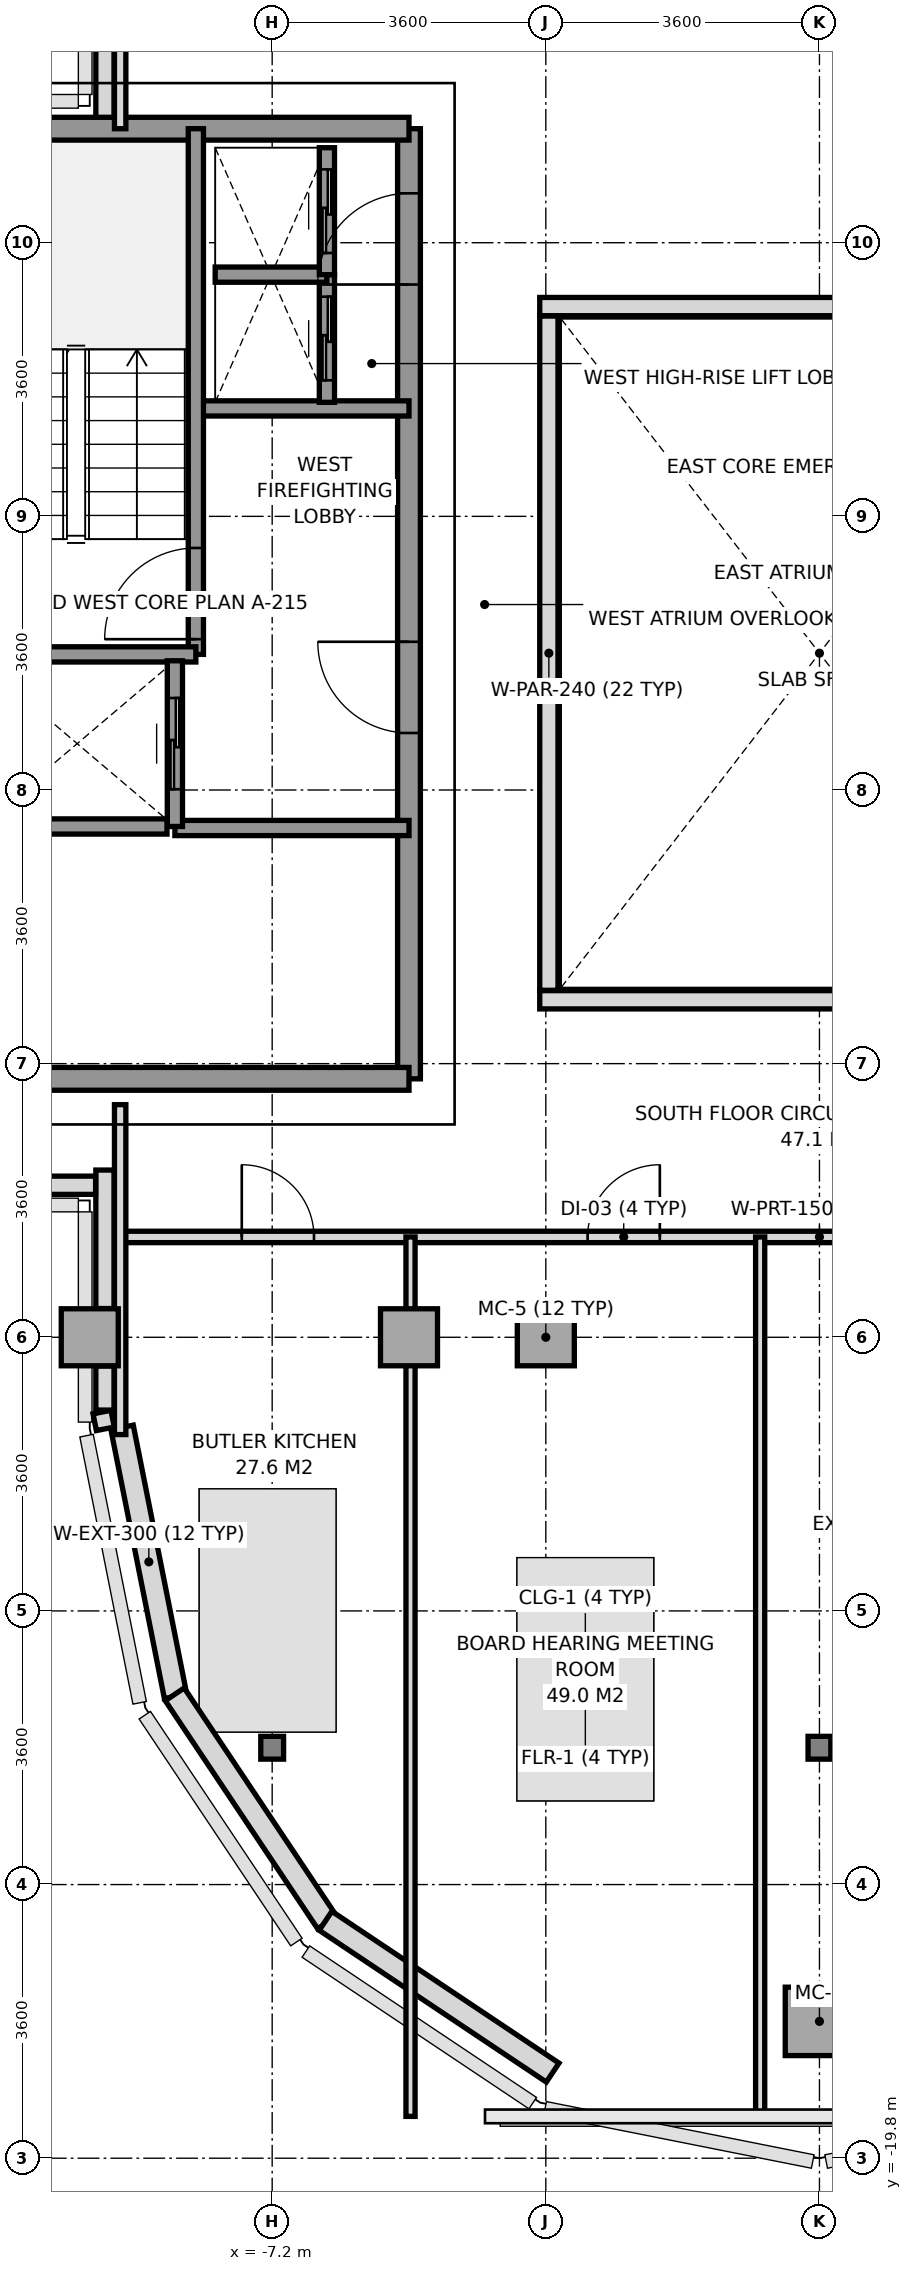
"""IFC4 building model, lengths in metres.
Left out: names, types, materials, properties, quantities, classifications, styles, units other than length and angle.
Written with IfcOpenShell. Run it as: python <this file> out.ifc"""

import sys

from ifc_helpers import new_model, si_unit, direction, frame, frame_2d, origin, origin_2d, place, context, subcontext, project, spatial, rectangle, i_section, extrude, source, transform, mapped, element, fill, save


model = new_model("IFC4")
c1 = context("Model", 3, precision=1e-05, world=origin(), true_north=direction((0.0, 1.0)))
c2 = subcontext(c1, "Body", "Model", "MODEL_VIEW")
j1 = project(units=[si_unit("LENGTHUNIT", "METRE"), si_unit("PLANEANGLEUNIT", "RADIAN")], contexts=[c1])
p1 = place(None, origin())
s1 = spatial("IfcSite", under=j1, at=p1, CompositionType="ELEMENT")
p2 = place(p1, origin())
s2 = spatial("IfcBuilding", under=s1, at=p2, CompositionType="ELEMENT")
p3 = place(p2, frame((0.0, 0.0, 262.0)))
s3 = spatial("IfcBuildingStorey", under=s2, at=p3, CompositionType="ELEMENT", Elevation=262.0)
m1 = source(origin(), c2, "Body", "SweptSolid", [
    extrude(rectangle(XDim=0.75, YDim=0.75, at=origin_2d()), origin(), (0.0, 0.0, 1.0), 3.01),
])
p4 = place(p3, frame((-9.6, -9.0, 0.0), z_axis=(0.0, 0.0, 1.0), x_axis=(1.0, 0.0, 0.0)))
e1 = element("IfcColumn", 1, at=p4, inside=s3, PredefinedType="COLUMN", context=c2, shape_type="MappedRepresentation", body=[
    mapped(m1, transform((0.0, 0.0, 0.0), x_axis=(1.0, 0.0, 0.0), y_axis=(0.0, 1.0, 0.0), z_axis=(0.0, 0.0, 1.0), scale=1.0)),
])
m2 = source(origin(), c2, "Body", "SweptSolid", [
    extrude(i_section(OverallWidth=0.3, OverallDepth=0.3, WebThickness=0.011, FlangeThickness=0.019, at=origin_2d()), origin(), (0.0, 0.0, 1.0), 3.01),
])
p5 = place(p3, frame((-7.2, -14.4, 0.0), z_axis=(0.0, 0.0, 1.0), x_axis=(1.0, 0.0, 0.0)))
e2 = element("IfcColumn", 2, at=p5, inside=s3, PredefinedType="COLUMN", context=c2, shape_type="MappedRepresentation", body=[
    mapped(m2, transform((0.0, 0.0, 0.0), x_axis=(1.0, 0.0, 0.0), y_axis=(0.0, 1.0, 0.0), z_axis=(0.0, 0.0, 1.0), scale=1.0)),
])
for number, where, z_axis, x_axis in (
    (3, (-5.4, -9.0, 0.0), (0.0, 0.0, 1.0), (1.0, 0.0, 0.0)),
    (4, (-3.6, -9.0, 0.0), (0.0, 0.0, 1.0), (1.0, 0.0, 0.0)),
):
    element("IfcColumn", number, at=place(p3, frame(where, z_axis=z_axis, x_axis=x_axis)), inside=s3, PredefinedType="COLUMN", context=c2, shape_type="MappedRepresentation", body=[
        mapped(m1, transform((0.0, 0.0, 0.0), x_axis=(1.0, 0.0, 0.0), y_axis=(0.0, 1.0, 0.0), z_axis=(0.0, 0.0, 1.0), scale=1.0)),
    ])
m3 = source(origin(), c2, "Body", "SweptSolid", [
    extrude(rectangle(XDim=0.9, YDim=0.9, at=origin_2d()), origin(), (0.0, 0.0, 1.0), 3.01),
])
p6 = place(p3, frame((0.0, -18.0, 0.0), z_axis=(0.0, 0.0, 1.0), x_axis=(1.0, 0.0, 0.0)))
e5 = element("IfcColumn", 5, at=p6, inside=s3, PredefinedType="COLUMN", context=c2, shape_type="MappedRepresentation", body=[
    mapped(m3, transform((0.0, 0.0, 0.0), x_axis=(1.0, 0.0, 0.0), y_axis=(0.0, 1.0, 0.0), z_axis=(0.0, 0.0, 1.0), scale=1.0)),
])
p7 = place(p3, frame((0.0, -14.4, 0.0), z_axis=(0.0, 0.0, 1.0), x_axis=(1.0, 0.0, 0.0)))
e6 = element("IfcColumn", 6, at=p7, inside=s3, PredefinedType="COLUMN", context=c2, shape_type="MappedRepresentation", body=[
    mapped(m2, transform((0.0, 0.0, 0.0), x_axis=(1.0, 0.0, 0.0), y_axis=(0.0, 1.0, 0.0), z_axis=(0.0, 0.0, 1.0), scale=1.0)),
])
p8 = place(p3, frame((-9.175, -10.185, 0.0), z_axis=(0.0, 0.0, 1.0), x_axis=(0.195114232679, -0.980780523974, 0.0)))
e7 = element("IfcWall", 7, at=p8, inside=s3, PredefinedType="SOLIDWALL", context=c2, shape_type="SweptSolid", body=[
    extrude(rectangle(XDim=3.609, YDim=0.3, at=frame_2d((1.804, 0.0))), origin(), (0.0, 0.0, 1.0), 3.01),
])
p9 = place(p3, frame((-8.482, -13.698, 0.0), z_axis=(0.0, 0.0, 1.0), x_axis=(0.555574187116, -0.831466970246, 0.0)))
e8 = element("IfcWall", 8, at=p9, inside=s3, PredefinedType="SOLIDWALL", context=c2, shape_type="SweptSolid", body=[
    extrude(rectangle(XDim=3.609, YDim=0.3, at=frame_2d((1.804, 0.0))), origin(), (0.0, 0.0, 1.0), 2.61),
])
p10 = place(p3, frame((-6.498, -16.677, 0.0), z_axis=(0.0, 0.0, 1.0), x_axis=(0.831443568068, -0.555609208993, 0.0)))
e9 = element("IfcWall", 9, at=p10, inside=s3, PredefinedType="SOLIDWALL", context=c2, shape_type="SweptSolid", body=[
    extrude(rectangle(XDim=3.594, YDim=0.3, at=frame_2d((1.797, 0.0))), origin(), (0.0, 0.0, 1.0), 3.01),
])
p11 = place(p3, frame((-9.395, -10.204, 0.0), z_axis=(0.0, 0.0, 1.0), x_axis=(-0.194859894132, 0.980831087221, 0.0)))
e10 = element("IfcWall", 10, at=p11, inside=s3, PredefinedType="PARAPET", context=c2, shape_type="SweptSolid", body=[
    extrude(rectangle(XDim=0.224, YDim=0.24, at=frame_2d((0.112, 0.0))), origin(), (0.0, 0.0, 1.0), 1.15),
])
p12 = place(p3, frame((-9.4, -9.958, 0.0), z_axis=(0.0, 0.0, 1.0), x_axis=(0.0, 1.0, 0.0)))
e11 = element("IfcWall", 11, at=p12, inside=s3, PredefinedType="PARAPET", context=c2, shape_type="SweptSolid", body=[
    extrude(rectangle(XDim=0.58, YDim=0.24, at=frame_2d((0.29, 0.0))), origin(), (0.0, 0.0, 1.0), 1.15),
])
p13 = place(p3, frame((-9.4, -8.622, 0.0), z_axis=(0.0, 0.0, 1.0), x_axis=(0.0, 1.0, 0.0)))
e12 = element("IfcWall", 12, at=p13, inside=s3, PredefinedType="PARAPET", context=c2, shape_type="SweptSolid", body=[
    extrude(rectangle(XDim=1.822, YDim=0.24, at=frame_2d((0.911, 0.0))), origin(), (0.0, 0.0, 1.0), 1.15),
])
p14 = place(p3, frame((-9.523, -7.0, 0.0), z_axis=(0.0, 0.0, 1.0), x_axis=(-1.0, 0.0, 0.0)))
e13 = element("IfcWall", 13, at=p14, inside=s3, PredefinedType="PARAPET", context=c2, shape_type="SweptSolid", body=[
    extrude(rectangle(XDim=3.477, YDim=0.24, at=frame_2d((1.739, 0.0))), origin(), (0.0, 0.0, 1.0), 1.15),
])
p15 = place(p3, frame((-9.4, 6.953, 0.0), z_axis=(0.0, 0.0, 1.0), x_axis=(0.0, 1.0, 0.0)))
e14 = element("IfcWall", 14, at=p15, inside=s3, PredefinedType="PARAPET", context=c2, shape_type="SweptSolid", body=[
    extrude(rectangle(XDim=1.669, YDim=0.24, at=frame_2d((0.834, 0.0))), origin(), (0.0, 0.0, 1.0), 1.15),
])
p16 = place(p3, frame((-5.4, -5.6, 0.0), z_axis=(0.0, 0.0, 1.0), x_axis=(0.0, 1.0, 0.0)))
e15 = element("IfcWall", 15, at=p16, inside=s3, PredefinedType="SHEAR", context=c2, shape_type="SweptSolid", body=[
    extrude(rectangle(XDim=12.5, YDim=0.3, at=frame_2d((6.25, 0.0))), origin(), (0.0, 0.0, 1.0), 3.01),
])
p17 = place(p16, frame((4.55, 0.0, 0.0)))
e16 = element("IfcOpeningElement", 16, at=p17, cuts=e15, PredefinedType="OPENING", context=c2, shape_type="SweptSolid", body=[
    extrude(rectangle(XDim=1.2, YDim=2.2, at=frame_2d((0.6, 1.1))), frame((0.0, 0.16, 0.0), z_axis=(0.0, -1.0, 0.0), x_axis=(1.0, 0.0, 0.0)), (0.0, 0.0, 1.0), 0.32),
])
p18 = place(p16, frame((10.45, 0.0, 0.0)))
e17 = element("IfcOpeningElement", 17, at=p18, cuts=e15, PredefinedType="OPENING", context=c2, shape_type="SweptSolid", body=[
    extrude(rectangle(XDim=1.2, YDim=2.2, at=frame_2d((0.6, 1.1))), frame((0.0, 0.16, 0.0), z_axis=(0.0, -1.0, 0.0), x_axis=(1.0, 0.0, 0.0)), (0.0, 0.0, 1.0), 0.32),
])
p19 = place(p3, frame((-11.356, 6.9, 0.0), z_axis=(0.0, 0.0, 1.0), x_axis=(1.0, 0.0, 0.0)))
e18 = element("IfcWall", 18, at=p19, inside=s3, PredefinedType="SHEAR", context=c2, shape_type="SweptSolid", body=[
    extrude(rectangle(XDim=5.956, YDim=0.3, at=frame_2d((2.978, 0.0))), origin(), (0.0, 0.0, 1.0), 3.01),
])
p20 = place(p3, frame((-13.2, -5.6, 0.0), z_axis=(0.0, 0.0, 1.0), x_axis=(1.0, 0.0, 0.0)))
e19 = element("IfcWall", 19, at=p20, inside=s3, PredefinedType="SHEAR", context=c2, shape_type="SweptSolid", body=[
    extrude(rectangle(XDim=7.8, YDim=0.3, at=frame_2d((3.9, 0.0))), origin(), (0.0, 0.0, 1.0), 3.01),
])
p21 = place(p3, frame((-8.18, 3.22, 0.0), z_axis=(0.0, 0.0, 1.0), x_axis=(1.0, 0.0, 0.0)))
e20 = element("IfcWall", 20, at=p21, inside=s3, PredefinedType="SOLIDWALL", context=c2, shape_type="SweptSolid", body=[
    extrude(rectangle(XDim=2.78, YDim=0.2, at=frame_2d((1.39, 0.0))), origin(), (0.0, 0.0, 1.0), 3.01),
])
p22 = place(p3, frame((-8.48, -2.3, 0.0), z_axis=(0.0, 0.0, 1.0), x_axis=(1.0, 0.0, 0.0)))
e21 = element("IfcWall", 21, at=p22, inside=s3, PredefinedType="SOLIDWALL", context=c2, shape_type="SweptSolid", body=[
    extrude(rectangle(XDim=3.08, YDim=0.2, at=frame_2d((1.54, 0.0))), origin(), (0.0, 0.0, 1.0), 3.01),
])
p23 = place(p3, frame((-8.204, -0.016, 0.0), z_axis=(0.0, 0.0, 1.0), x_axis=(0.0, 1.0, 0.0)))
e22 = element("IfcWall", 22, at=p23, inside=s3, PredefinedType="SOLIDWALL", context=c2, shape_type="SweptSolid", body=[
    extrude(rectangle(XDim=6.916, YDim=0.2, at=frame_2d((3.458, 0.0))), origin(), (0.0, 0.0, 1.0), 3.01),
])
p24 = place(p23, frame((0.2, 0.0, 0.0)))
e23 = element("IfcOpeningElement", 23, at=p24, cuts=e22, PredefinedType="OPENING", context=c2, shape_type="SweptSolid", body=[
    extrude(rectangle(XDim=1.2, YDim=2.2, at=frame_2d((0.6, 1.1))), frame((0.0, 0.11, 0.0), z_axis=(0.0, -1.0, 0.0), x_axis=(1.0, 0.0, 0.0)), (0.0, 0.0, 1.0), 0.22),
])
p25 = place(p3, frame((-11.356, -0.016, 0.0), z_axis=(0.0, 0.0, 1.0), x_axis=(1.0, 0.0, 0.0)))
e24 = element("IfcWall", 24, at=p25, inside=s3, PredefinedType="SOLIDWALL", context=c2, shape_type="SweptSolid", body=[
    extrude(rectangle(XDim=3.152, YDim=0.2, at=frame_2d((1.576, 0.0))), origin(), (0.0, 0.0, 1.0), 3.01),
])
p26 = place(p3, frame((-8.48, -2.28, 0.0), z_axis=(0.0, 0.0, 1.0), x_axis=(0.0, 1.0, 0.0)))
e25 = element("IfcWall", 25, at=p26, inside=s3, PredefinedType="SOLIDWALL", context=c2, shape_type="SweptSolid", body=[
    extrude(rectangle(XDim=2.18, YDim=0.2, at=frame_2d((1.09, 0.0))), origin(), (0.0, 0.0, 1.0), 3.01),
])
p27 = place(p26, frame((0.49, 0.0, 0.0)))
e26 = element("IfcOpeningElement", 26, at=p27, cuts=e25, PredefinedType="OPENING", context=c2, shape_type="SweptSolid", body=[
    extrude(rectangle(XDim=1.2, YDim=2.2, at=frame_2d((0.6, 1.1))), frame((0.0, 0.11, 0.0), z_axis=(0.0, -1.0, 0.0), x_axis=(1.0, 0.0, 0.0)), (0.0, 0.0, 1.0), 0.22),
])
p28 = place(p3, frame((-10.946, -2.28, 0.0), z_axis=(0.0, 0.0, 1.0), x_axis=(1.0, 0.0, 0.0)))
e27 = element("IfcWall", 27, at=p28, inside=s3, PredefinedType="SOLIDWALL", context=c2, shape_type="SweptSolid", body=[
    extrude(rectangle(XDim=2.362, YDim=0.2, at=frame_2d((1.181, 0.0))), origin(), (0.0, 0.0, 1.0), 3.01),
])
p29 = place(p3, frame((-6.48, 3.3, 0.0), z_axis=(0.0, 0.0, 1.0), x_axis=(0.0, 1.0, 0.0)))
e28 = element("IfcWall", 28, at=p29, inside=s3, PredefinedType="SOLIDWALL", context=c2, shape_type="SweptSolid", body=[
    extrude(rectangle(XDim=1.68, YDim=0.2, at=frame_2d((0.84, 0.0))), origin(), (0.0, 0.0, 1.0), 3.01),
])
p30 = place(p29, frame((0.29, 0.0, 0.0)))
e29 = element("IfcOpeningElement", 29, at=p30, cuts=e28, PredefinedType="OPENING", context=c2, shape_type="SweptSolid", body=[
    extrude(rectangle(XDim=1.1, YDim=2.2, at=frame_2d((0.55, 1.1))), frame((0.0, 0.11, 0.0), z_axis=(0.0, -1.0, 0.0), x_axis=(1.0, 0.0, 0.0)), (0.0, 0.0, 1.0), 0.22),
])
p31 = place(p3, frame((-7.95, 4.98, 0.0), z_axis=(0.0, 0.0, 1.0), x_axis=(1.0, 0.0, 0.0)))
e30 = element("IfcWall", 30, at=p31, inside=s3, PredefinedType="SOLIDWALL", context=c2, shape_type="SweptSolid", body=[
    extrude(rectangle(XDim=1.47, YDim=0.2, at=frame_2d((0.735, 0.0))), origin(), (0.0, 0.0, 1.0), 3.01),
])
p32 = place(p3, frame((-6.48, 4.98, 0.0), z_axis=(0.0, 0.0, 1.0), x_axis=(0.0, 1.0, 0.0)))
e31 = element("IfcWall", 31, at=p32, inside=s3, PredefinedType="SOLIDWALL", context=c2, shape_type="SweptSolid", body=[
    extrude(rectangle(XDim=1.67, YDim=0.2, at=frame_2d((0.835, 0.0))), origin(), (0.0, 0.0, 1.0), 3.01),
])
p33 = place(p32, frame((0.285, 0.0, 0.0)))
e32 = element("IfcOpeningElement", 32, at=p33, cuts=e31, PredefinedType="OPENING", context=c2, shape_type="SweptSolid", body=[
    extrude(rectangle(XDim=1.1, YDim=2.2, at=frame_2d((0.55, 1.1))), frame((0.0, 0.11, 0.0), z_axis=(0.0, -1.0, 0.0), x_axis=(1.0, 0.0, 0.0)), (0.0, 0.0, 1.0), 0.22),
])
p34 = place(p3, frame((-9.2, 6.9, 0.0), z_axis=(0.0, 0.0, 1.0), x_axis=(0.0, 1.0, 0.0)))
e33 = element("IfcWall", 33, at=p34, inside=s3, PredefinedType="PARTITIONING", context=c2, shape_type="SweptSolid", body=[
    extrude(rectangle(XDim=3.38, YDim=0.15, at=frame_2d((1.69, 0.0))), origin(), (0.0, 0.0, 1.0), 2.61),
])
p35 = place(p3, frame((-9.2, -7.68, 0.0), z_axis=(0.0, 0.0, 1.0), x_axis=(1.0, 0.0, 0.0)))
e34 = element("IfcWall", 34, at=p35, inside=s3, PredefinedType="PARTITIONING", context=c2, shape_type="SweptSolid", body=[
    extrude(rectangle(XDim=18.4, YDim=0.15, at=frame_2d((9.2, 0.0))), origin(), (0.0, 0.0, 1.0), 2.57),
])
p36 = place(p35, frame((1.6, 0.0, 0.0)))
e35 = element("IfcOpeningElement", 35, at=p36, cuts=e34, PredefinedType="OPENING", context=c2, shape_type="SweptSolid", body=[
    extrude(rectangle(XDim=0.95, YDim=2.15, at=frame_2d((0.475, 1.075))), frame((0.0, 0.085, 0.0), z_axis=(0.0, -1.0, 0.0), x_axis=(1.0, 0.0, 0.0)), (0.0, 0.0, 1.0), 0.17),
])
p37 = place(p35, frame((6.15, 0.0, 0.0)))
e36 = element("IfcOpeningElement", 36, at=p37, cuts=e34, PredefinedType="OPENING", context=c2, shape_type="SweptSolid", body=[
    extrude(rectangle(XDim=0.95, YDim=2.15, at=frame_2d((0.475, 1.075))), frame((0.0, 0.085, 0.0), z_axis=(0.0, -1.0, 0.0), x_axis=(1.0, 0.0, 0.0)), (0.0, 0.0, 1.0), 0.17),
])
p38 = place(p35, frame((10.6, 0.0, 0.0)))
e37 = element("IfcOpeningElement", 37, at=p38, cuts=e34, PredefinedType="OPENING", context=c2, shape_type="SweptSolid", body=[
    extrude(rectangle(XDim=1.1, YDim=2.2, at=frame_2d((0.55, 1.1))), frame((0.0, 0.085, 0.0), z_axis=(0.0, -1.0, 0.0), x_axis=(1.0, 0.0, 0.0)), (0.0, 0.0, 1.0), 0.17),
])
p39 = place(p35, frame((15.2, 0.0, 0.0)))
e38 = element("IfcOpeningElement", 38, at=p39, cuts=e34, PredefinedType="OPENING", context=c2, shape_type="SweptSolid", body=[
    extrude(rectangle(XDim=0.95, YDim=2.15, at=frame_2d((0.475, 1.075))), frame((0.0, 0.085, 0.0), z_axis=(0.0, -1.0, 0.0), x_axis=(1.0, 0.0, 0.0)), (0.0, 0.0, 1.0), 0.17),
])
p40 = place(p3, frame((-9.2, -10.28, 0.0), z_axis=(0.0, 0.0, 1.0), x_axis=(0.0, 1.0, 0.0)))
e39 = element("IfcWall", 39, at=p40, inside=s3, PredefinedType="PARTITIONING", context=c2, shape_type="SweptSolid", body=[
    extrude(rectangle(XDim=4.34, YDim=0.15, at=frame_2d((2.17, 0.0))), origin(), (0.0, 0.0, 1.0), 2.61),
])
for number, where, z_axis, x_axis in (
    (40, (-5.38, -19.25, 0.0), (0.0, 0.0, 1.0), (0.0, 1.0, 0.0)),
    (41, (-0.78, -19.25, 0.0), (0.0, 0.0, 1.0), (0.0, 1.0, 0.0)),
):
    element("IfcWall", number, at=place(p3, frame(where, z_axis=z_axis, x_axis=x_axis)), inside=s3, PredefinedType="PARTITIONING", context=c2, shape_type="SweptSolid", body=[
        extrude(rectangle(XDim=11.57, YDim=0.12, at=frame_2d((5.785, 0.0))), origin(), (0.0, 0.0, 1.0), 2.61),
    ])
for number, where, z_axis, x_axis in (
    (42, (-3.68, -4.56, 0.0), (0.0, 0.0, 1.0), (1.0, 0.0, 0.0)),
    (43, (-3.68, 4.56, 0.0), (0.0, 0.0, 1.0), (1.0, 0.0, 0.0)),
):
    element("IfcWall", number, at=place(p3, frame(where, z_axis=z_axis, x_axis=x_axis)), inside=s3, PredefinedType="PARAPET", context=c2, shape_type="SweptSolid", body=[
        extrude(rectangle(XDim=7.36, YDim=0.24, at=frame_2d((3.68, 0.0))), origin(), (0.0, 0.0, 1.0), 1.15),
    ])
p41 = place(p3, frame((-3.56, -4.435, 0.0), z_axis=(0.0, 0.0, 1.0), x_axis=(0.0, 1.0, 0.0)))
e44 = element("IfcWall", 44, at=p41, inside=s3, PredefinedType="PARAPET", context=c2, shape_type="SweptSolid", body=[
    extrude(rectangle(XDim=8.87, YDim=0.24, at=frame_2d((4.435, 0.0))), origin(), (0.0, 0.0, 1.0), 1.15),
])
m4 = source(origin(), c2, "Body", "SweptSolid", [
    extrude(rectangle(XDim=1.2, YDim=2.2, at=frame_2d((0.6, 1.1))), frame((0.0, 0.025, 0.0), z_axis=(0.0, -1.0, 0.0), x_axis=(1.0, 0.0, 0.0)), (0.0, 0.0, 1.0), 0.05),
])
p42 = place(p24, origin())
e45 = element("IfcDoor", 45, at=p42, inside=s3, OperationType="SINGLE_SWING_LEFT", PredefinedType="DOOR", context=c2, shape_type="MappedRepresentation", body=[
    mapped(m4, transform((0.0, 0.0, 0.0), x_axis=(1.0, 0.0, 0.0), y_axis=(0.0, 1.0, 0.0), z_axis=(0.0, 0.0, 1.0), scale=1.0)),
])
fill(e23, e45)
p43 = place(p17, origin())
e46 = element("IfcDoor", 46, at=p43, inside=s3, OperationType="SINGLE_SWING_RIGHT", PredefinedType="DOOR", context=c2, shape_type="MappedRepresentation", body=[
    mapped(m4, transform((0.0, 0.0, 0.0), x_axis=(1.0, 0.0, 0.0), y_axis=(0.0, 1.0, 0.0), z_axis=(0.0, 0.0, 1.0), scale=1.0)),
])
fill(e16, e46)
p44 = place(p18, origin())
e47 = element("IfcDoor", 47, at=p44, inside=s3, OperationType="SINGLE_SWING_LEFT", PredefinedType="DOOR", context=c2, shape_type="MappedRepresentation", body=[
    mapped(m4, transform((0.0, 0.0, 0.0), x_axis=(1.0, 0.0, 0.0), y_axis=(0.0, 1.0, 0.0), z_axis=(0.0, 0.0, 1.0), scale=1.0)),
])
fill(e17, e47)
p45 = place(p27, origin())
e48 = element("IfcDoor", 48, at=p45, inside=s3, OperationType="SLIDING_TO_RIGHT", PredefinedType="DOOR", context=c2, shape_type="MappedRepresentation", body=[
    mapped(m4, transform((0.0, 0.0, 0.0), x_axis=(1.0, 0.0, 0.0), y_axis=(0.0, 1.0, 0.0), z_axis=(0.0, 0.0, 1.0), scale=1.0)),
])
fill(e26, e48)
m5 = source(origin(), c2, "Body", "SweptSolid", [
    extrude(rectangle(XDim=1.1, YDim=2.2, at=frame_2d((0.55, 1.1))), frame((0.0, 0.025, 0.0), z_axis=(0.0, -1.0, 0.0), x_axis=(1.0, 0.0, 0.0)), (0.0, 0.0, 1.0), 0.05),
])
p46 = place(p30, origin())
e49 = element("IfcDoor", 49, at=p46, inside=s3, OperationType="SLIDING_TO_LEFT", PredefinedType="DOOR", context=c2, shape_type="MappedRepresentation", body=[
    mapped(m5, transform((0.0, 0.0, 0.0), x_axis=(1.0, 0.0, 0.0), y_axis=(0.0, 1.0, 0.0), z_axis=(0.0, 0.0, 1.0), scale=1.0)),
])
fill(e29, e49)
p47 = place(p33, origin())
e50 = element("IfcDoor", 50, at=p47, inside=s3, OperationType="SLIDING_TO_LEFT", PredefinedType="DOOR", context=c2, shape_type="MappedRepresentation", body=[
    mapped(m5, transform((0.0, 0.0, 0.0), x_axis=(1.0, 0.0, 0.0), y_axis=(0.0, 1.0, 0.0), z_axis=(0.0, 0.0, 1.0), scale=1.0)),
])
fill(e32, e50)
m6 = source(origin(), c2, "Body", "SweptSolid", [
    extrude(rectangle(XDim=0.95, YDim=2.15, at=frame_2d((0.475, 1.075))), frame((0.0, 0.025, 0.0), z_axis=(0.0, -1.0, 0.0), x_axis=(1.0, 0.0, 0.0)), (0.0, 0.0, 1.0), 0.05),
])
p48 = place(p36, origin())
e51 = element("IfcDoor", 51, at=p48, inside=s3, OperationType="SINGLE_SWING_LEFT", PredefinedType="DOOR", context=c2, shape_type="MappedRepresentation", body=[
    mapped(m6, transform((0.0, 0.0, 0.0), x_axis=(1.0, 0.0, 0.0), y_axis=(0.0, 1.0, 0.0), z_axis=(0.0, 0.0, 1.0), scale=1.0)),
])
fill(e35, e51)
p49 = place(p37, origin())
e52 = element("IfcDoor", 52, at=p49, inside=s3, OperationType="SINGLE_SWING_RIGHT", PredefinedType="DOOR", context=c2, shape_type="MappedRepresentation", body=[
    mapped(m6, transform((0.0, 0.0, 0.0), x_axis=(1.0, 0.0, 0.0), y_axis=(0.0, 1.0, 0.0), z_axis=(0.0, 0.0, 1.0), scale=1.0)),
])
fill(e36, e52)
save(model, sys.argv[1])
